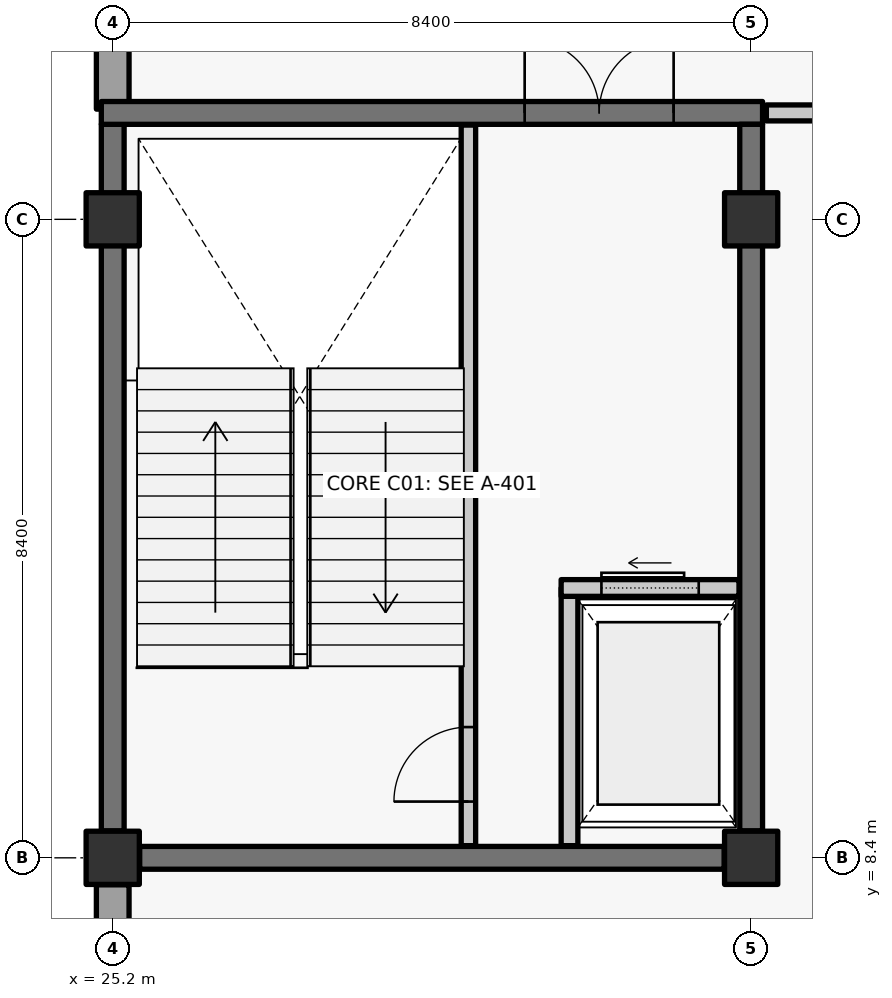
"""IFC4 building model, lengths in metres.
Left out: names, types, materials, properties, quantities, classifications, styles, units other than length and angle.
Written with IfcOpenShell. Run it as: python <this file> out.ifc"""

import sys

from ifc_helpers import new_model, si_unit, direction, frame, frame_2d, origin, origin_2d, place, context, subcontext, project, spatial, rectangle, extrude, element, fill, save


model = new_model("IFC4")
c1 = context("Model", 3, precision=1e-05, world=origin(), true_north=direction((0.0, 1.0)))
c2 = subcontext(c1, "Body", "Model", "MODEL_VIEW")
j1 = project(units=[si_unit("LENGTHUNIT", "METRE"), si_unit("PLANEANGLEUNIT", "RADIAN")], contexts=[c1])
p1 = place(None, origin())
s1 = spatial("IfcSite", under=j1, at=p1, CompositionType="ELEMENT")
p2 = place(p1, origin())
s2 = spatial("IfcBuilding", under=s1, at=p2, CompositionType="ELEMENT")
p3 = place(p2, frame((0.0, 0.0, 11.4)))
s3 = spatial("IfcBuildingStorey", under=s2, at=p3, CompositionType="ELEMENT", Elevation=11.4)
for number, where, z_axis, x_axis in (
    (1, (25.2, 8.4, 0.0), (0.0, 0.0, 1.0), (1.0, 0.0, 0.0)),
    (2, (25.2, 16.8, 0.0), (0.0, 0.0, 1.0), (1.0, 0.0, 0.0)),
    (3, (33.6, 8.4, 0.0), (0.0, 0.0, 1.0), (1.0, 0.0, 0.0)),
    (4, (33.6, 16.8, 0.0), (0.0, 0.0, 1.0), (1.0, 0.0, 0.0)),
):
    element("IfcColumn", number, at=place(p3, frame(where, z_axis=z_axis, x_axis=x_axis)), inside=s3, PredefinedType="COLUMN", context=c2, shape_type="SweptSolid", body=[
        extrude(rectangle(XDim=0.7, YDim=0.7, at=origin_2d()), origin(), (0.0, 0.0, 1.0), 4.8),
    ])
p4 = place(p3, frame((25.2, 0.355, 0.0), z_axis=(0.0, 0.0, 1.0), x_axis=(0.0, 1.0, 0.0)))
e5 = element("IfcWall", 5, at=p4, inside=s3, PredefinedType="SOLIDWALL", context=c2, shape_type="SweptSolid", body=[
    extrude(rectangle(XDim=7.69, YDim=0.43, at=frame_2d((3.845, 0.0))), origin(), (0.0, 0.0, 1.0), 4.52),
])
p5 = place(p4, frame((2.87, 0.0, 0.95)))
e6 = element("IfcOpeningElement", 6, at=p5, cuts=e5, PredefinedType="OPENING", context=c2, shape_type="SweptSolid", body=[
    extrude(rectangle(XDim=1.95, YDim=2.05, at=frame_2d((0.975, 1.025))), frame((0.0, 0.225, 0.0), z_axis=(0.0, -1.0, 0.0), x_axis=(1.0, 0.0, 0.0)), (0.0, 0.0, 1.0), 0.45),
])
p6 = place(p3, frame((25.2, 18.25, 0.0), z_axis=(0.0, 0.0, 1.0), x_axis=(0.0, 1.0, 0.0)))
e7 = element("IfcWall", 7, at=p6, inside=s3, PredefinedType="SOLIDWALL", context=c2, shape_type="SweptSolid", body=[
    extrude(rectangle(XDim=6.595, YDim=0.43, at=frame_2d((3.297, 0.0))), origin(), (0.0, 0.0, 1.0), 4.52),
])
p7 = place(p6, frame((2.275, 0.0, 0.95)))
e8 = element("IfcOpeningElement", 8, at=p7, cuts=e7, PredefinedType="OPENING", context=c2, shape_type="SweptSolid", body=[
    extrude(rectangle(XDim=1.95, YDim=2.05, at=frame_2d((0.975, 1.025))), frame((0.0, 0.225, 0.0), z_axis=(0.0, -1.0, 0.0), x_axis=(1.0, 0.0, 0.0)), (0.0, 0.0, 1.0), 0.45),
])
p8 = place(p3, frame((33.245, 8.4, 0.0), z_axis=(0.0, 0.0, 1.0), x_axis=(-1.0, 0.0, 0.0)))
e9 = element("IfcWall", 9, at=p8, inside=s3, PredefinedType="SHEAR", context=c2, shape_type="SweptSolid", body=[
    extrude(rectangle(XDim=7.69, YDim=0.3, at=frame_2d((3.845, 0.0))), origin(), (0.0, 0.0, 1.0), 4.52),
])
p9 = place(p3, frame((25.2, 8.755, 0.0), z_axis=(0.0, 0.0, 1.0), x_axis=(0.0, 1.0, 0.0)))
e10 = element("IfcWall", 10, at=p9, inside=s3, PredefinedType="SHEAR", context=c2, shape_type="SweptSolid", body=[
    extrude(rectangle(XDim=9.295, YDim=0.3, at=frame_2d((4.647, 0.0))), origin(), (0.0, 0.0, 1.0), 4.52),
])
p10 = place(p3, frame((25.05, 18.2, 0.0), z_axis=(0.0, 0.0, 1.0), x_axis=(1.0, 0.0, 0.0)))
e11 = element("IfcWall", 11, at=p10, inside=s3, PredefinedType="SHEAR", context=c2, shape_type="SweptSolid", body=[
    extrude(rectangle(XDim=8.7, YDim=0.3, at=frame_2d((4.35, 0.0))), origin(), (0.0, 0.0, 1.0), 4.52),
])
p11 = place(p10, frame((5.57, 0.0, 0.0)))
e12 = element("IfcOpeningElement", 12, at=p11, cuts=e11, PredefinedType="OPENING", context=c2, shape_type="SweptSolid", body=[
    extrude(rectangle(XDim=1.96, YDim=2.2, at=frame_2d((0.98, 1.1))), frame((0.0, 0.16, 0.0), z_axis=(0.0, -1.0, 0.0), x_axis=(1.0, 0.0, 0.0)), (0.0, 0.0, 1.0), 0.32),
])
p12 = place(p3, frame((33.6, 18.05, 0.0), z_axis=(0.0, 0.0, 1.0), x_axis=(0.0, -1.0, 0.0)))
e13 = element("IfcWall", 13, at=p12, inside=s3, PredefinedType="SHEAR", context=c2, shape_type="SweptSolid", body=[
    extrude(rectangle(XDim=9.295, YDim=0.3, at=frame_2d((4.647, 0.0))), origin(), (0.0, 0.0, 1.0), 4.52),
])
p13 = place(p3, frame((29.88, 8.56, 0.0), z_axis=(0.0, 0.0, 1.0), x_axis=(0.0, 1.0, 0.0)))
e14 = element("IfcWall", 14, at=p13, inside=s3, PredefinedType="SOLIDWALL", context=c2, shape_type="SweptSolid", body=[
    extrude(rectangle(XDim=9.48, YDim=0.19, at=frame_2d((4.74, 0.0))), origin(), (0.0, 0.0, 1.0), 4.52),
])
p14 = place(p13, frame((0.58, 0.0, 0.0)))
e15 = element("IfcOpeningElement", 15, at=p14, cuts=e14, PredefinedType="OPENING", context=c2, shape_type="SweptSolid", body=[
    extrude(rectangle(XDim=0.98, YDim=2.15, at=frame_2d((0.49, 1.075))), frame((0.0, 0.105, 0.0), z_axis=(0.0, -1.0, 0.0), x_axis=(1.0, 0.0, 0.0)), (0.0, 0.0, 1.0), 0.21),
])
p15 = place(p3, frame((31.21, 8.56, 0.0), z_axis=(0.0, 0.0, 1.0), x_axis=(0.0, 1.0, 0.0)))
e16 = element("IfcWall", 16, at=p15, inside=s3, PredefinedType="SOLIDWALL", context=c2, shape_type="SweptSolid", body=[
    extrude(rectangle(XDim=3.39, YDim=0.22, at=frame_2d((1.695, 0.0))), origin(), (0.0, 0.0, 1.0), 4.52),
])
p16 = place(p3, frame((31.1, 11.95, 0.0), z_axis=(0.0, 0.0, 1.0), x_axis=(1.0, 0.0, 0.0)))
e17 = element("IfcWall", 17, at=p16, inside=s3, PredefinedType="SOLIDWALL", context=c2, shape_type="SweptSolid", body=[
    extrude(rectangle(XDim=2.34, YDim=0.22, at=frame_2d((1.17, 0.0))), origin(), (0.0, 0.0, 1.0), 4.52),
])
p17 = place(p16, frame((0.53, 0.0, 0.0)))
e18 = element("IfcOpeningElement", 18, at=p17, cuts=e17, PredefinedType="OPENING", context=c2, shape_type="SweptSolid", body=[
    extrude(rectangle(XDim=1.28, YDim=2.25, at=frame_2d((0.64, 1.125))), frame((0.0, 0.12, 0.0), z_axis=(0.0, -1.0, 0.0), x_axis=(1.0, 0.0, 0.0)), (0.0, 0.0, 1.0), 0.24),
])
p18 = place(p3, frame((33.8, 18.2, 0.0), z_axis=(0.0, 0.0, 1.0), x_axis=(1.0, 0.0, 0.0)))
e19 = element("IfcWall", 19, at=p18, inside=s3, PredefinedType="PARTITIONING", context=c2, shape_type="SweptSolid", body=[
    extrude(rectangle(XDim=33.2, YDim=0.21, at=frame_2d((16.6, 0.0))), origin(), (0.0, 0.0, 1.0), 4.52),
])
p19 = place(p18, frame((3.5, 0.0, 0.0)))
e20 = element("IfcOpeningElement", 20, at=p19, cuts=e19, PredefinedType="OPENING", context=c2, shape_type="SweptSolid", body=[
    extrude(rectangle(XDim=1.0, YDim=2.15, at=frame_2d((0.5, 1.075))), frame((0.0, 0.115, 0.0), z_axis=(0.0, -1.0, 0.0), x_axis=(1.0, 0.0, 0.0)), (0.0, 0.0, 1.0), 0.23),
])
p20 = place(p18, frame((20.3, 0.0, 0.0)))
e21 = element("IfcOpeningElement", 21, at=p20, cuts=e19, PredefinedType="OPENING", context=c2, shape_type="SweptSolid", body=[
    extrude(rectangle(XDim=1.0, YDim=2.15, at=frame_2d((0.5, 1.075))), frame((0.0, 0.115, 0.0), z_axis=(0.0, -1.0, 0.0), x_axis=(1.0, 0.0, 0.0)), (0.0, 0.0, 1.0), 0.23),
])
p21 = place(p14, origin())
e22 = element("IfcDoor", 22, at=p21, inside=s3, OperationType="SINGLE_SWING_LEFT", PredefinedType="DOOR", context=c2, shape_type="SweptSolid", body=[
    extrude(rectangle(XDim=0.98, YDim=2.15, at=frame_2d((0.49, 1.075))), frame((0.0, 0.025, 0.0), z_axis=(0.0, -1.0, 0.0), x_axis=(1.0, 0.0, 0.0)), (0.0, 0.0, 1.0), 0.05),
])
fill(e15, e22)
p22 = place(p11, origin())
e23 = element("IfcDoor", 23, at=p22, inside=s3, OperationType="DOUBLE_DOOR_SINGLE_SWING", PredefinedType="DOOR", context=c2, shape_type="SweptSolid", body=[
    extrude(rectangle(XDim=1.96, YDim=2.2, at=frame_2d((0.98, 1.1))), frame((0.0, 0.025, 0.0), z_axis=(0.0, -1.0, 0.0), x_axis=(1.0, 0.0, 0.0)), (0.0, 0.0, 1.0), 0.05),
])
fill(e12, e23)
p23 = place(p17, origin())
e24 = element("IfcDoor", 24, at=p23, inside=s3, OperationType="SLIDING_TO_LEFT", PredefinedType="DOOR", context=c2, shape_type="SweptSolid", body=[
    extrude(rectangle(XDim=1.28, YDim=2.25, at=frame_2d((0.64, 1.125))), frame((0.0, 0.025, 0.0), z_axis=(0.0, -1.0, 0.0), x_axis=(1.0, 0.0, 0.0)), (0.0, 0.0, 1.0), 0.05),
])
fill(e18, e24)
save(model, sys.argv[1])
